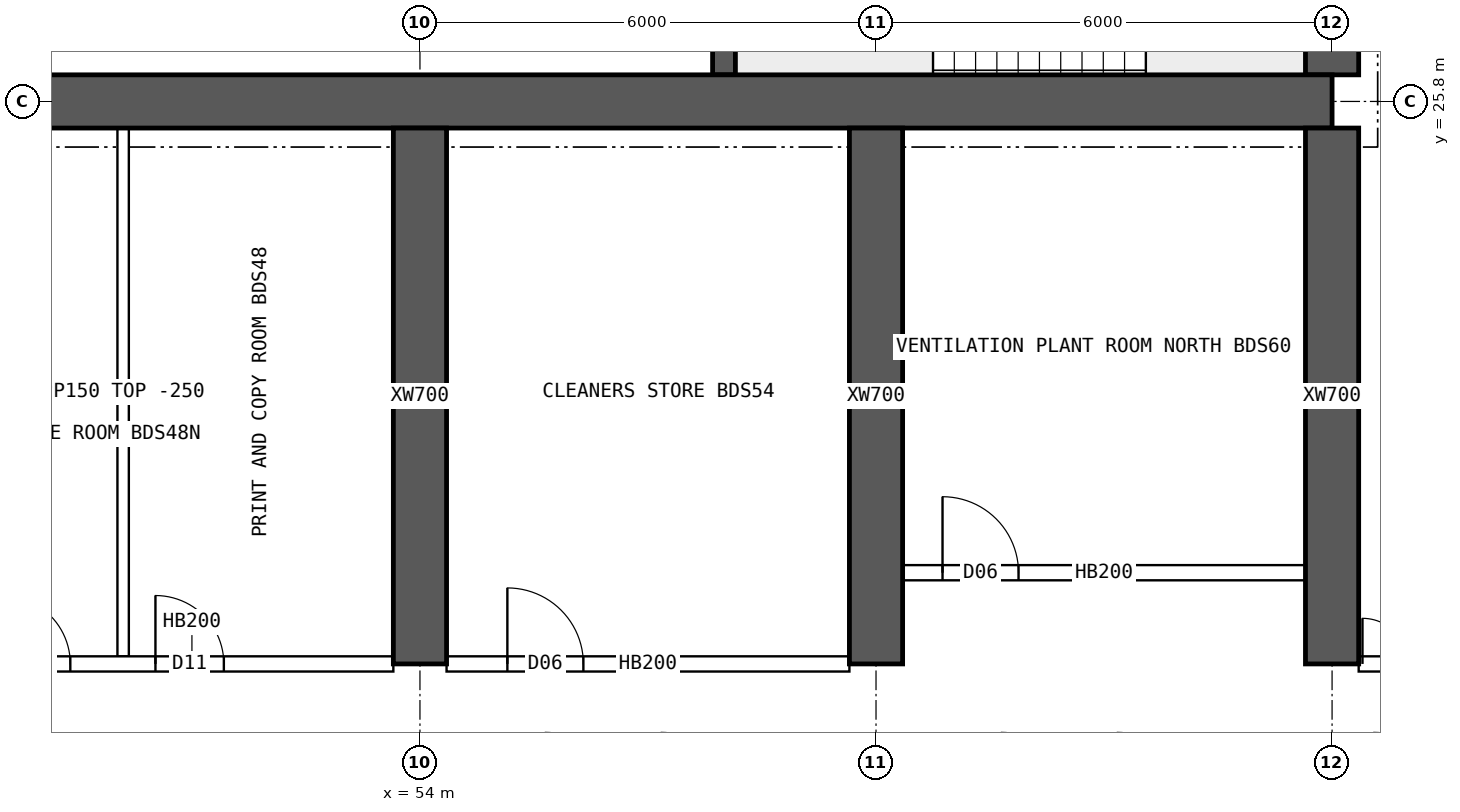
"""IFC4 building model, lengths in metres.
Left out: names, types, materials, properties, quantities, classifications, styles, units other than length and angle.
Written with IfcOpenShell. Run it as: python <this file> out.ifc"""

import sys

from ifc_helpers import new_model, si_unit, direction, frame, frame_2d, origin, place, context, subcontext, project, spatial, rectangle, extrude, element, fill, save


model = new_model("IFC4")
c1 = context("Model", 3, precision=1e-05, world=origin(), true_north=direction((0.0, 1.0)))
c2 = subcontext(c1, "Body", "Model", "MODEL_VIEW")
j1 = project(units=[si_unit("LENGTHUNIT", "METRE"), si_unit("PLANEANGLEUNIT", "RADIAN")], contexts=[c1])
p1 = place(None, origin())
s1 = spatial("IfcSite", under=j1, at=p1, CompositionType="ELEMENT")
p2 = place(p1, origin())
s2 = spatial("IfcBuilding", under=s1, at=p2, CompositionType="ELEMENT")
p3 = place(p2, frame((0.0, 0.0, 239.05)))
s3 = spatial("IfcBuildingStorey", under=s2, at=p3, CompositionType="ELEMENT", Elevation=239.05)
p4 = place(p3, frame((18.0, 25.8, 0.0), z_axis=(0.0, 0.0, 1.0), x_axis=(1.0, 0.0, 0.0)))
e1 = element("IfcWall", 1, at=p4, inside=s3, PredefinedType="SHEAR", context=c2, shape_type="SweptSolid", body=[
    extrude(rectangle(XDim=48.0, YDim=0.7, at=frame_2d((24.0, 0.0))), origin(), (0.0, 0.0, 1.0), 3.75),
])
p5 = place(p3, frame((66.0, 26.15, 0.0), z_axis=(0.0, 0.0, 1.0), x_axis=(0.0, 1.0, 0.0)))
e2 = element("IfcWall", 2, at=p5, inside=s3, PredefinedType="SHEAR", context=c2, shape_type="SweptSolid", body=[
    extrude(rectangle(XDim=11.7, YDim=0.7, at=frame_2d((5.85, 0.0))), origin(), (0.0, 0.0, 1.0), 3.75),
])
p6 = place(p5, frame((5.15, 0.0, 0.0)))
e3 = element("IfcOpeningElement", 3, at=p6, cuts=e2, PredefinedType="OPENING", context=c2, shape_type="SweptSolid", body=[
    extrude(rectangle(XDim=1.2, YDim=2.1, at=frame_2d((0.6, 1.05))), frame((0.0, 0.36, 0.0), z_axis=(0.0, -1.0, 0.0), x_axis=(1.0, 0.0, 0.0)), (0.0, 0.0, 1.0), 0.72),
])
p7 = place(p3, frame((58.0, 26.15, 0.0), z_axis=(0.0, 0.0, 1.0), x_axis=(0.0, 1.0, 0.0)))
e4 = element("IfcWall", 4, at=p7, inside=s3, PredefinedType="SHEAR", context=c2, shape_type="SweptSolid", body=[
    extrude(rectangle(XDim=4.1, YDim=0.3, at=frame_2d((2.05, 0.0))), origin(), (0.0, 0.0, 1.0), 3.75),
])
for number, where, z_axis, x_axis in (
    (5, (54.0, 18.4, 0.0), (0.0, 0.0, 1.0), (0.0, 1.0, 0.0)),
    (6, (60.0, 18.4, 0.0), (0.0, 0.0, 1.0), (0.0, 1.0, 0.0)),
    (7, (66.0, 18.4, 0.0), (0.0, 0.0, 1.0), (0.0, 1.0, 0.0)),
):
    element("IfcWall", number, at=place(p3, frame(where, z_axis=z_axis, x_axis=x_axis)), inside=s3, PredefinedType="SHEAR", context=c2, shape_type="SweptSolid", body=[
        extrude(rectangle(XDim=7.05, YDim=0.7, at=frame_2d((3.525, 0.0))), origin(), (0.0, 0.0, 1.0), 3.75),
    ])
p8 = place(p3, frame((48.35, 18.4, 0.0), z_axis=(0.0, 0.0, 1.0), x_axis=(1.0, 0.0, 0.0)))
e8 = element("IfcWall", 8, at=p8, inside=s3, PredefinedType="SOLIDWALL", context=c2, shape_type="SweptSolid", body=[
    extrude(rectangle(XDim=5.3, YDim=0.2, at=frame_2d((2.65, 0.0))), origin(), (0.0, 0.0, 1.0), 3.5),
])
p9 = place(p8, frame((0.15, 0.0, 0.0)))
e9 = element("IfcOpeningElement", 9, at=p9, cuts=e8, PredefinedType="OPENING", context=c2, shape_type="SweptSolid", body=[
    extrude(rectangle(XDim=0.9, YDim=2.1, at=frame_2d((0.45, 1.05))), frame((0.0, 0.11, 0.0), z_axis=(0.0, -1.0, 0.0), x_axis=(1.0, 0.0, 0.0)), (0.0, 0.0, 1.0), 0.22),
])
p10 = place(p8, frame((2.17, 0.0, 0.0)))
e10 = element("IfcOpeningElement", 10, at=p10, cuts=e8, PredefinedType="OPENING", context=c2, shape_type="SweptSolid", body=[
    extrude(rectangle(XDim=0.9, YDim=2.1, at=frame_2d((0.45, 1.05))), frame((0.0, 0.11, 0.0), z_axis=(0.0, -1.0, 0.0), x_axis=(1.0, 0.0, 0.0)), (0.0, 0.0, 1.0), 0.22),
])
p11 = place(p3, frame((54.35, 18.4, 0.0), z_axis=(0.0, 0.0, 1.0), x_axis=(1.0, 0.0, 0.0)))
e11 = element("IfcWall", 11, at=p11, inside=s3, PredefinedType="SOLIDWALL", context=c2, shape_type="SweptSolid", body=[
    extrude(rectangle(XDim=5.3, YDim=0.2, at=frame_2d((2.65, 0.0))), origin(), (0.0, 0.0, 1.0), 3.5),
])
p12 = place(p11, frame((0.8, 0.0, 0.0)))
e12 = element("IfcOpeningElement", 12, at=p12, cuts=e11, PredefinedType="OPENING", context=c2, shape_type="SweptSolid", body=[
    extrude(rectangle(XDim=1.0, YDim=2.1, at=frame_2d((0.5, 1.05))), frame((0.0, 0.11, 0.0), z_axis=(0.0, -1.0, 0.0), x_axis=(1.0, 0.0, 0.0)), (0.0, 0.0, 1.0), 0.22),
])
p13 = place(p3, frame((66.35, 18.4, 0.0), z_axis=(0.0, 0.0, 1.0), x_axis=(1.0, 0.0, 0.0)))
e13 = element("IfcWall", 13, at=p13, inside=s3, PredefinedType="SOLIDWALL", context=c2, shape_type="SweptSolid", body=[
    extrude(rectangle(XDim=2.05, YDim=0.2, at=frame_2d((1.025, 0.0))), origin(), (0.0, 0.0, 1.0), 3.5),
])
p14 = place(p13, frame((0.05, 0.0, 0.0)))
e14 = element("IfcOpeningElement", 14, at=p14, cuts=e13, PredefinedType="OPENING", context=c2, shape_type="SweptSolid", body=[
    extrude(rectangle(XDim=1.2, YDim=2.1, at=frame_2d((0.6, 1.05))), frame((0.0, 0.11, 0.0), z_axis=(0.0, -1.0, 0.0), x_axis=(1.0, 0.0, 0.0)), (0.0, 0.0, 1.0), 0.22),
])
p15 = place(p3, frame((50.095, 18.5, 0.0), z_axis=(0.0, 0.0, 1.0), x_axis=(0.0, 1.0, 0.0)))
e15 = element("IfcWall", 15, at=p15, inside=s3, PredefinedType="PARTITIONING", context=c2, shape_type="SweptSolid", body=[
    extrude(rectangle(XDim=6.95, YDim=0.15, at=frame_2d((3.475, 0.0))), origin(), (0.0, 0.0, 1.0), 3.5),
])
p16 = place(p3, frame((60.35, 19.6, 0.0), z_axis=(0.0, 0.0, 1.0), x_axis=(1.0, 0.0, 0.0)))
e16 = element("IfcWall", 16, at=p16, inside=s3, PredefinedType="SOLIDWALL", context=c2, shape_type="SweptSolid", body=[
    extrude(rectangle(XDim=5.3, YDim=0.2, at=frame_2d((2.65, 0.0))), origin(), (0.0, 0.0, 1.0), 3.5),
])
p17 = place(p16, frame((0.525, 0.0, 0.0)))
e17 = element("IfcOpeningElement", 17, at=p17, cuts=e16, PredefinedType="OPENING", context=c2, shape_type="SweptSolid", body=[
    extrude(rectangle(XDim=1.0, YDim=2.1, at=frame_2d((0.5, 1.05))), frame((0.0, 0.11, 0.0), z_axis=(0.0, -1.0, 0.0), x_axis=(1.0, 0.0, 0.0)), (0.0, 0.0, 1.0), 0.22),
])
p18 = place(p14, origin())
e18 = element("IfcDoor", 18, at=p18, inside=s3, OperationType="DOUBLE_DOOR_SINGLE_SWING", PredefinedType="DOOR", context=c2, shape_type="SweptSolid", body=[
    extrude(rectangle(XDim=1.2, YDim=2.1, at=frame_2d((0.6, 1.05))), frame((0.0, 0.025, 0.0), z_axis=(0.0, -1.0, 0.0), x_axis=(1.0, 0.0, 0.0)), (0.0, 0.0, 1.0), 0.05),
])
fill(e14, e18)
p19 = place(p9, origin())
e19 = element("IfcDoor", 19, at=p19, inside=s3, OperationType="SINGLE_SWING_LEFT", PredefinedType="DOOR", context=c2, shape_type="SweptSolid", body=[
    extrude(rectangle(XDim=0.9, YDim=2.1, at=frame_2d((0.45, 1.05))), frame((0.0, 0.025, 0.0), z_axis=(0.0, -1.0, 0.0), x_axis=(1.0, 0.0, 0.0)), (0.0, 0.0, 1.0), 0.05),
])
fill(e9, e19)
p20 = place(p10, origin())
e20 = element("IfcDoor", 20, at=p20, inside=s3, OperationType="SINGLE_SWING_LEFT", PredefinedType="DOOR", context=c2, shape_type="SweptSolid", body=[
    extrude(rectangle(XDim=0.9, YDim=2.1, at=frame_2d((0.45, 1.05))), frame((0.0, 0.025, 0.0), z_axis=(0.0, -1.0, 0.0), x_axis=(1.0, 0.0, 0.0)), (0.0, 0.0, 1.0), 0.05),
])
fill(e10, e20)
p21 = place(p12, origin())
e21 = element("IfcDoor", 21, at=p21, inside=s3, OperationType="SINGLE_SWING_LEFT", PredefinedType="DOOR", context=c2, shape_type="SweptSolid", body=[
    extrude(rectangle(XDim=1.0, YDim=2.1, at=frame_2d((0.5, 1.05))), frame((0.0, 0.025, 0.0), z_axis=(0.0, -1.0, 0.0), x_axis=(1.0, 0.0, 0.0)), (0.0, 0.0, 1.0), 0.05),
])
fill(e12, e21)
p22 = place(p17, origin())
e22 = element("IfcDoor", 22, at=p22, inside=s3, OperationType="SINGLE_SWING_LEFT", PredefinedType="DOOR", context=c2, shape_type="SweptSolid", body=[
    extrude(rectangle(XDim=1.0, YDim=2.1, at=frame_2d((0.5, 1.05))), frame((0.0, 0.025, 0.0), z_axis=(0.0, -1.0, 0.0), x_axis=(1.0, 0.0, 0.0)), (0.0, 0.0, 1.0), 0.05),
])
fill(e17, e22)
save(model, sys.argv[1])
